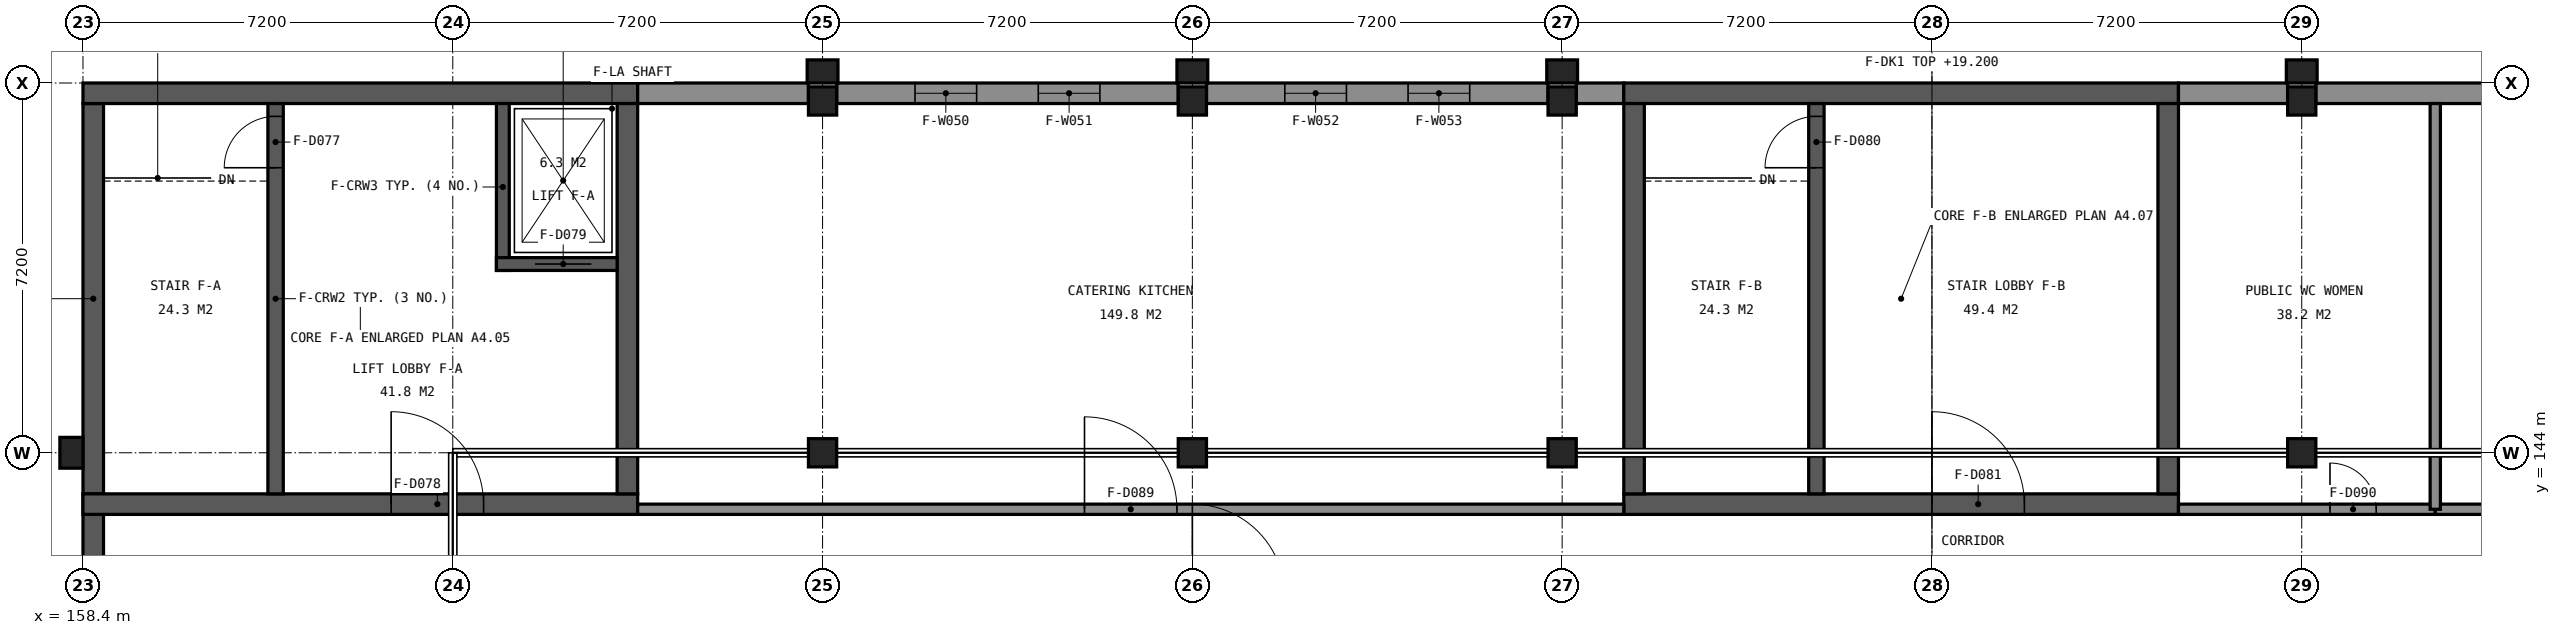
"""IFC4 building model, lengths in metres.
Left out: names, types, materials, properties, quantities, classifications, styles, units other than length and angle.
Written with IfcOpenShell. Run it as: python <this file> out.ifc"""

import sys

from ifc_helpers import new_model, si_unit, direction, frame, frame_2d, origin, origin_2d, place, context, subcontext, project, spatial, rectangle, extrude, element, fill, save


model = new_model("IFC4")
c1 = context("Model", 3, precision=1e-05, world=origin(), true_north=direction((0.0, 1.0)))
c2 = subcontext(c1, "Body", "Model", "MODEL_VIEW")
j1 = project(units=[si_unit("LENGTHUNIT", "METRE"), si_unit("PLANEANGLEUNIT", "RADIAN")], contexts=[c1])
p1 = place(None, origin())
s1 = spatial("IfcSite", under=j1, at=p1, CompositionType="ELEMENT")
p2 = place(p1, origin())
s2 = spatial("IfcBuilding", under=s1, at=p2, CompositionType="ELEMENT")
p3 = place(p2, frame((0.0, 0.0, 14.4)))
s3 = spatial("IfcBuildingStorey", under=s2, at=p3, CompositionType="ELEMENT", Elevation=14.4)
for number, where, z_axis, x_axis in (
    (1, (172.8, 144.0, 0.0), (0.0, 0.0, 1.0), (1.0, 0.0, 0.0)),
    (2, (180.0, 144.0, 0.0), (0.0, 0.0, 1.0), (1.0, 0.0, 0.0)),
    (3, (187.2, 144.0, 0.0), (0.0, 0.0, 1.0), (1.0, 0.0, 0.0)),
    (4, (201.6, 144.0, 0.0), (0.0, 0.0, 1.0), (1.0, 0.0, 0.0)),
    (5, (172.8, 150.85, 0.0), (0.0, 0.0, 1.0), (1.0, 0.0, 0.0)),
    (6, (180.0, 150.85, 0.0), (0.0, 0.0, 1.0), (1.0, 0.0, 0.0)),
    (7, (187.2, 150.85, 0.0), (0.0, 0.0, 1.0), (1.0, 0.0, 0.0)),
    (8, (201.6, 150.85, 0.0), (0.0, 0.0, 1.0), (1.0, 0.0, 0.0)),
):
    element("IfcColumn", number, at=place(p3, frame(where, z_axis=z_axis, x_axis=x_axis)), inside=s3, PredefinedType="COLUMN", context=c2, shape_type="SweptSolid", body=[
        extrude(rectangle(XDim=0.55, YDim=0.55, at=origin_2d()), origin(), (0.0, 0.0, 1.0), 4.8),
    ])
p4 = place(p3, frame((158.6, 137.075, 0.0), z_axis=(0.0, 0.0, 1.0), x_axis=(0.0, 1.0, 0.0)))
e9 = element("IfcWall", 9, at=p4, inside=s3, PredefinedType="SHEAR", context=c2, shape_type="SweptSolid", body=[
    extrude(rectangle(XDim=6.125, YDim=0.4, at=frame_2d((3.062, 0.0))), origin(), (0.0, 0.0, 1.0), 3.95),
])
p5 = place(p4, frame((1.262, 0.0, 1.8)))
e10 = element("IfcOpeningElement", 10, at=p5, cuts=e9, PredefinedType="OPENING", context=c2, shape_type="SweptSolid", body=[
    extrude(rectangle(XDim=1.2, YDim=1.2, at=frame_2d((0.6, 0.6))), frame((0.0, 0.21, 0.0), z_axis=(0.0, -1.0, 0.0), x_axis=(1.0, 0.0, 0.0)), (0.0, 0.0, 1.0), 0.42),
])
p6 = place(p3, frame((158.6, 143.2, 0.0), z_axis=(0.0, 0.0, 1.0), x_axis=(0.0, 1.0, 0.0)))
e11 = element("IfcWall", 11, at=p6, inside=s3, PredefinedType="SHEAR", context=c2, shape_type="SweptSolid", body=[
    extrude(rectangle(XDim=7.6, YDim=0.4, at=frame_2d((3.8, 0.0))), origin(), (0.0, 0.0, 1.0), 4.55),
])
p7 = place(p3, frame((158.4, 151.0, 0.0), z_axis=(0.0, 0.0, 1.0), x_axis=(1.0, 0.0, 0.0)))
e12 = element("IfcWall", 12, at=p7, inside=s3, PredefinedType="SHEAR", context=c2, shape_type="SweptSolid", body=[
    extrude(rectangle(XDim=10.8, YDim=0.4, at=frame_2d((5.4, 0.0))), origin(), (0.0, 0.0, 1.0), 4.55),
])
p8 = place(p3, frame((169.2, 151.0, 0.0), z_axis=(0.0, 0.0, 1.0), x_axis=(1.0, 0.0, 0.0)))
e13 = element("IfcWall", 13, at=p8, inside=s3, PredefinedType="SOLIDWALL", context=c2, shape_type="SweptSolid", body=[
    extrude(rectangle(XDim=3.325, YDim=0.4, at=frame_2d((1.663, 0.0))), origin(), (0.0, 0.0, 1.0), 3.95),
])
p9 = place(p3, frame((173.075, 151.0, 0.0), z_axis=(0.0, 0.0, 1.0), x_axis=(1.0, 0.0, 0.0)))
e14 = element("IfcWall", 14, at=p9, inside=s3, PredefinedType="SOLIDWALL", context=c2, shape_type="SweptSolid", body=[
    extrude(rectangle(XDim=6.65, YDim=0.4, at=frame_2d((3.325, 0.0))), origin(), (0.0, 0.0, 1.0), 3.95),
])
p10 = place(p9, frame((1.525, 0.0, 1.8)))
e15 = element("IfcOpeningElement", 15, at=p10, cuts=e14, PredefinedType="OPENING", context=c2, shape_type="SweptSolid", body=[
    extrude(rectangle(XDim=1.2, YDim=1.2, at=frame_2d((0.6, 0.6))), frame((0.0, 0.21, 0.0), z_axis=(0.0, -1.0, 0.0), x_axis=(1.0, 0.0, 0.0)), (0.0, 0.0, 1.0), 0.42),
])
p11 = place(p9, frame((3.925, 0.0, 1.8)))
e16 = element("IfcOpeningElement", 16, at=p11, cuts=e14, PredefinedType="OPENING", context=c2, shape_type="SweptSolid", body=[
    extrude(rectangle(XDim=1.2, YDim=1.2, at=frame_2d((0.6, 0.6))), frame((0.0, 0.21, 0.0), z_axis=(0.0, -1.0, 0.0), x_axis=(1.0, 0.0, 0.0)), (0.0, 0.0, 1.0), 0.42),
])
p12 = place(p3, frame((180.275, 151.0, 0.0), z_axis=(0.0, 0.0, 1.0), x_axis=(1.0, 0.0, 0.0)))
e17 = element("IfcWall", 17, at=p12, inside=s3, PredefinedType="SOLIDWALL", context=c2, shape_type="SweptSolid", body=[
    extrude(rectangle(XDim=6.65, YDim=0.4, at=frame_2d((3.325, 0.0))), origin(), (0.0, 0.0, 1.0), 3.95),
])
p13 = place(p12, frame((1.525, 0.0, 1.8)))
e18 = element("IfcOpeningElement", 18, at=p13, cuts=e17, PredefinedType="OPENING", context=c2, shape_type="SweptSolid", body=[
    extrude(rectangle(XDim=1.2, YDim=1.2, at=frame_2d((0.6, 0.6))), frame((0.0, 0.21, 0.0), z_axis=(0.0, -1.0, 0.0), x_axis=(1.0, 0.0, 0.0)), (0.0, 0.0, 1.0), 0.42),
])
p14 = place(p12, frame((3.925, 0.0, 1.8)))
e19 = element("IfcOpeningElement", 19, at=p14, cuts=e17, PredefinedType="OPENING", context=c2, shape_type="SweptSolid", body=[
    extrude(rectangle(XDim=1.2, YDim=1.2, at=frame_2d((0.6, 0.6))), frame((0.0, 0.21, 0.0), z_axis=(0.0, -1.0, 0.0), x_axis=(1.0, 0.0, 0.0)), (0.0, 0.0, 1.0), 0.42),
])
p15 = place(p3, frame((187.475, 151.0, 0.0), z_axis=(0.0, 0.0, 1.0), x_axis=(1.0, 0.0, 0.0)))
e20 = element("IfcWall", 20, at=p15, inside=s3, PredefinedType="SOLIDWALL", context=c2, shape_type="SweptSolid", body=[
    extrude(rectangle(XDim=0.925, YDim=0.4, at=frame_2d((0.462, 0.0))), origin(), (0.0, 0.0, 1.0), 3.95),
])
p16 = place(p3, frame((188.4, 151.0, 0.0), z_axis=(0.0, 0.0, 1.0), x_axis=(1.0, 0.0, 0.0)))
e21 = element("IfcWall", 21, at=p16, inside=s3, PredefinedType="SHEAR", context=c2, shape_type="SweptSolid", body=[
    extrude(rectangle(XDim=10.8, YDim=0.4, at=frame_2d((5.4, 0.0))), origin(), (0.0, 0.0, 1.0), 4.55),
])
p17 = place(p3, frame((199.2, 151.0, 0.0), z_axis=(0.0, 0.0, 1.0), x_axis=(1.0, 0.0, 0.0)))
e22 = element("IfcWall", 22, at=p17, inside=s3, PredefinedType="SOLIDWALL", context=c2, shape_type="SweptSolid", body=[
    extrude(rectangle(XDim=2.125, YDim=0.4, at=frame_2d((1.062, 0.0))), origin(), (0.0, 0.0, 1.0), 3.95),
])
p18 = place(p3, frame((201.875, 151.0, 0.0), z_axis=(0.0, 0.0, 1.0), x_axis=(1.0, 0.0, 0.0)))
e23 = element("IfcWall", 23, at=p18, inside=s3, PredefinedType="SOLIDWALL", context=c2, shape_type="SweptSolid", body=[
    extrude(rectangle(XDim=6.65, YDim=0.4, at=frame_2d((3.325, 0.0))), origin(), (0.0, 0.0, 1.0), 3.95),
])
p19 = place(p18, frame((3.925, 0.0, 1.8)))
e24 = element("IfcOpeningElement", 24, at=p19, cuts=e23, PredefinedType="OPENING", context=c2, shape_type="SweptSolid", body=[
    extrude(rectangle(XDim=1.2, YDim=1.2, at=frame_2d((0.6, 0.6))), frame((0.0, 0.21, 0.0), z_axis=(0.0, -1.0, 0.0), x_axis=(1.0, 0.0, 0.0)), (0.0, 0.0, 1.0), 0.42),
])
p20 = place(p3, frame((158.4, 143.0, 0.0), z_axis=(0.0, 0.0, 1.0), x_axis=(1.0, 0.0, 0.0)))
e25 = element("IfcWall", 25, at=p20, inside=s3, PredefinedType="SHEAR", context=c2, shape_type="SweptSolid", body=[
    extrude(rectangle(XDim=10.8, YDim=0.4, at=frame_2d((5.4, 0.0))), origin(), (0.0, 0.0, 1.0), 4.55),
])
p21 = place(p20, frame((6.0, 0.0, 0.0)))
e26 = element("IfcOpeningElement", 26, at=p21, cuts=e25, PredefinedType="OPENING", context=c2, shape_type="SweptSolid", body=[
    extrude(rectangle(XDim=1.8, YDim=2.1, at=frame_2d((0.9, 1.05))), frame((0.0, 0.21, 0.0), z_axis=(0.0, -1.0, 0.0), x_axis=(1.0, 0.0, 0.0)), (0.0, 0.0, 1.0), 0.42),
])
p22 = place(p3, frame((169.0, 143.2, 0.0), z_axis=(0.0, 0.0, 1.0), x_axis=(0.0, 1.0, 0.0)))
e27 = element("IfcWall", 27, at=p22, inside=s3, PredefinedType="SHEAR", context=c2, shape_type="SweptSolid", body=[
    extrude(rectangle(XDim=7.6, YDim=0.4, at=frame_2d((3.8, 0.0))), origin(), (0.0, 0.0, 1.0), 4.55),
])
p23 = place(p3, frame((162.15, 143.2, 0.0), z_axis=(0.0, 0.0, 1.0), x_axis=(0.0, 1.0, 0.0)))
e28 = element("IfcWall", 28, at=p23, inside=s3, PredefinedType="SHEAR", context=c2, shape_type="SweptSolid", body=[
    extrude(rectangle(XDim=7.6, YDim=0.3, at=frame_2d((3.8, 0.0))), origin(), (0.0, 0.0, 1.0), 4.55),
])
p24 = place(p23, frame((6.35, 0.0, 0.0)))
e29 = element("IfcOpeningElement", 29, at=p24, cuts=e28, PredefinedType="OPENING", context=c2, shape_type="SweptSolid", body=[
    extrude(rectangle(XDim=1.0, YDim=2.1, at=frame_2d((0.5, 1.05))), frame((0.0, 0.16, 0.0), z_axis=(0.0, -1.0, 0.0), x_axis=(1.0, 0.0, 0.0)), (0.0, 0.0, 1.0), 0.32),
])
p25 = place(p3, frame((166.575, 147.55, 0.0), z_axis=(0.0, 0.0, 1.0), x_axis=(0.0, 1.0, 0.0)))
e30 = element("IfcWall", 30, at=p25, inside=s3, PredefinedType="SHEAR", context=c2, shape_type="SweptSolid", body=[
    extrude(rectangle(XDim=3.25, YDim=0.25, at=frame_2d((1.625, 0.0))), origin(), (0.0, 0.0, 1.0), 4.55),
])
p26 = place(p3, frame((166.45, 147.675, 0.0), z_axis=(0.0, 0.0, 1.0), x_axis=(1.0, 0.0, 0.0)))
e31 = element("IfcWall", 31, at=p26, inside=s3, PredefinedType="SHEAR", context=c2, shape_type="SweptSolid", body=[
    extrude(rectangle(XDim=2.35, YDim=0.25, at=frame_2d((1.175, 0.0))), origin(), (0.0, 0.0, 1.0), 4.55),
])
p27 = place(p26, frame((0.75, 0.0, 0.0)))
e32 = element("IfcOpeningElement", 32, at=p27, cuts=e31, PredefinedType="OPENING", context=c2, shape_type="SweptSolid", body=[
    extrude(rectangle(XDim=1.1, YDim=2.1, at=frame_2d((0.55, 1.05))), frame((0.0, 0.135, 0.0), z_axis=(0.0, -1.0, 0.0), x_axis=(1.0, 0.0, 0.0)), (0.0, 0.0, 1.0), 0.27),
])
p28 = place(p3, frame((188.4, 143.0, 0.0), z_axis=(0.0, 0.0, 1.0), x_axis=(1.0, 0.0, 0.0)))
e33 = element("IfcWall", 33, at=p28, inside=s3, PredefinedType="SHEAR", context=c2, shape_type="SweptSolid", body=[
    extrude(rectangle(XDim=10.8, YDim=0.4, at=frame_2d((5.4, 0.0))), origin(), (0.0, 0.0, 1.0), 4.55),
])
p29 = place(p28, frame((6.0, 0.0, 0.0)))
e34 = element("IfcOpeningElement", 34, at=p29, cuts=e33, PredefinedType="OPENING", context=c2, shape_type="SweptSolid", body=[
    extrude(rectangle(XDim=1.8, YDim=2.1, at=frame_2d((0.9, 1.05))), frame((0.0, 0.21, 0.0), z_axis=(0.0, -1.0, 0.0), x_axis=(1.0, 0.0, 0.0)), (0.0, 0.0, 1.0), 0.42),
])
for number, where, z_axis, x_axis in (
    (35, (188.6, 143.2, 0.0), (0.0, 0.0, 1.0), (0.0, 1.0, 0.0)),
    (36, (199.0, 143.2, 0.0), (0.0, 0.0, 1.0), (0.0, 1.0, 0.0)),
):
    element("IfcWall", number, at=place(p3, frame(where, z_axis=z_axis, x_axis=x_axis)), inside=s3, PredefinedType="SHEAR", context=c2, shape_type="SweptSolid", body=[
        extrude(rectangle(XDim=7.6, YDim=0.4, at=frame_2d((3.8, 0.0))), origin(), (0.0, 0.0, 1.0), 4.55),
    ])
p30 = place(p3, frame((192.15, 143.2, 0.0), z_axis=(0.0, 0.0, 1.0), x_axis=(0.0, 1.0, 0.0)))
e37 = element("IfcWall", 37, at=p30, inside=s3, PredefinedType="SHEAR", context=c2, shape_type="SweptSolid", body=[
    extrude(rectangle(XDim=7.6, YDim=0.3, at=frame_2d((3.8, 0.0))), origin(), (0.0, 0.0, 1.0), 4.55),
])
p31 = place(p30, frame((6.35, 0.0, 0.0)))
e38 = element("IfcOpeningElement", 38, at=p31, cuts=e37, PredefinedType="OPENING", context=c2, shape_type="SweptSolid", body=[
    extrude(rectangle(XDim=1.0, YDim=2.1, at=frame_2d((0.5, 1.05))), frame((0.0, 0.16, 0.0), z_axis=(0.0, -1.0, 0.0), x_axis=(1.0, 0.0, 0.0)), (0.0, 0.0, 1.0), 0.32),
])
p32 = place(p3, frame((158.4, 151.0, 4.8), z_axis=(0.0, 0.0, 1.0), x_axis=(1.0, 0.0, 0.0)))
e39 = element("IfcWall", 39, at=p32, inside=s3, PredefinedType="SOLIDWALL", context=c2, shape_type="SweptSolid", body=[
    extrude(rectangle(XDim=72.0, YDim=0.4, at=frame_2d((36.0, 0.0))), origin(), (0.0, 0.0, 1.0), 0.45),
])
p33 = place(p3, frame((158.6, 130.0, 4.8), z_axis=(0.0, 0.0, 1.0), x_axis=(0.0, 1.0, 0.0)))
e40 = element("IfcWall", 40, at=p33, inside=s3, PredefinedType="SOLIDWALL", context=c2, shape_type="SweptSolid", body=[
    extrude(rectangle(XDim=20.8, YDim=0.4, at=frame_2d((10.4, 0.0))), origin(), (0.0, 0.0, 1.0), 0.45),
])
for number, where, z_axis, x_axis in (
    (41, (165.6, 144.0, 4.8), (0.0, 0.0, 1.0), (1.0, 0.0, 0.0)),
    (42, (172.8, 144.0, 4.8), (0.0, 0.0, 1.0), (1.0, 0.0, 0.0)),
    (43, (180.0, 144.0, 4.8), (0.0, 0.0, 1.0), (1.0, 0.0, 0.0)),
    (44, (187.2, 144.0, 4.8), (0.0, 0.0, 1.0), (1.0, 0.0, 0.0)),
    (45, (194.4, 144.0, 4.8), (0.0, 0.0, 1.0), (1.0, 0.0, 0.0)),
    (46, (201.6, 144.0, 4.8), (0.0, 0.0, 1.0), (1.0, 0.0, 0.0)),
):
    element("IfcColumn", number, at=place(p3, frame(where, z_axis=z_axis, x_axis=x_axis)), inside=s3, PredefinedType="COLUMN", context=c2, shape_type="SweptSolid", body=[
        extrude(rectangle(XDim=0.3, YDim=0.3, at=origin_2d()), origin(), (0.0, 0.0, 1.0), 1.4),
    ])
for number, where, z_axis, x_axis in (
    (47, (172.8, 151.425, 0.0), (0.0, 0.0, 1.0), (1.0, 0.0, 0.0)),
    (48, (180.0, 151.425, 0.0), (0.0, 0.0, 1.0), (1.0, 0.0, 0.0)),
    (49, (187.2, 151.425, 0.0), (0.0, 0.0, 1.0), (1.0, 0.0, 0.0)),
    (50, (201.6, 151.425, 0.0), (0.0, 0.0, 1.0), (1.0, 0.0, 0.0)),
    (51, (158.175, 144.0, 0.0), (0.0, 0.0, 1.0), (0.0, 1.0, 0.0)),
):
    element("IfcColumn", number, at=place(p3, frame(where, z_axis=z_axis, x_axis=x_axis)), inside=s3, PredefinedType="PILASTER", context=c2, shape_type="SweptSolid", body=[
        extrude(rectangle(XDim=0.6, YDim=0.45, at=origin_2d()), origin(), (0.0, 0.0, 1.0), 4.05),
    ])
p34 = place(p3, frame((157.8, 151.7, 4.5), z_axis=(0.0, 0.0, 1.0), x_axis=(1.0, 0.0, 0.0)))
e52 = element("IfcWall", 52, at=p34, inside=s3, PredefinedType="SOLIDWALL", context=c2, shape_type="SweptSolid", body=[
    extrude(rectangle(XDim=72.6, YDim=0.2, at=frame_2d((36.3, 0.0))), origin(), (0.0, 0.0, 1.0), 0.45),
])
p35 = place(p3, frame((157.9, 129.6, 4.5), z_axis=(0.0, 0.0, 1.0), x_axis=(0.0, 1.0, 0.0)))
e53 = element("IfcWall", 53, at=p35, inside=s3, PredefinedType="SOLIDWALL", context=c2, shape_type="SweptSolid", body=[
    extrude(rectangle(XDim=21.6, YDim=0.2, at=frame_2d((10.8, 0.0))), origin(), (0.0, 0.0, 1.0), 0.45),
])
p36 = place(p3, frame((169.2, 142.9, 0.0), z_axis=(0.0, 0.0, 1.0), x_axis=(1.0, 0.0, 0.0)))
e54 = element("IfcWall", 54, at=p36, inside=s3, PredefinedType="PARTITIONING", context=c2, shape_type="SweptSolid", body=[
    extrude(rectangle(XDim=19.2, YDim=0.2, at=frame_2d((9.6, 0.0))), origin(), (0.0, 0.0, 1.0), 3.95),
])
p37 = place(p36, frame((8.7, 0.0, 0.0)))
e55 = element("IfcOpeningElement", 55, at=p37, cuts=e54, PredefinedType="OPENING", context=c2, shape_type="SweptSolid", body=[
    extrude(rectangle(XDim=1.8, YDim=2.1, at=frame_2d((0.9, 1.05))), frame((0.0, 0.11, 0.0), z_axis=(0.0, -1.0, 0.0), x_axis=(1.0, 0.0, 0.0)), (0.0, 0.0, 1.0), 0.22),
])
p38 = place(p3, frame((199.2, 142.9, 0.0), z_axis=(0.0, 0.0, 1.0), x_axis=(1.0, 0.0, 0.0)))
e56 = element("IfcWall", 56, at=p38, inside=s3, PredefinedType="PARTITIONING", context=c2, shape_type="SweptSolid", body=[
    extrude(rectangle(XDim=5.0, YDim=0.2, at=frame_2d((2.5, 0.0))), origin(), (0.0, 0.0, 1.0), 3.95),
])
p39 = place(p38, frame((2.95, 0.0, 0.0)))
e57 = element("IfcOpeningElement", 57, at=p39, cuts=e56, PredefinedType="OPENING", context=c2, shape_type="SweptSolid", body=[
    extrude(rectangle(XDim=0.9, YDim=2.1, at=frame_2d((0.45, 1.05))), frame((0.0, 0.11, 0.0), z_axis=(0.0, -1.0, 0.0), x_axis=(1.0, 0.0, 0.0)), (0.0, 0.0, 1.0), 0.22),
])
p40 = place(p3, frame((204.2, 142.9, 0.0), z_axis=(0.0, 0.0, 1.0), x_axis=(1.0, 0.0, 0.0)))
e58 = element("IfcWall", 58, at=p40, inside=s3, PredefinedType="PARTITIONING", context=c2, shape_type="SweptSolid", body=[
    extrude(rectangle(XDim=5.0, YDim=0.2, at=frame_2d((2.5, 0.0))), origin(), (0.0, 0.0, 1.0), 3.95),
])
p41 = place(p40, frame((2.05, 0.0, 0.0)))
e59 = element("IfcOpeningElement", 59, at=p41, cuts=e58, PredefinedType="OPENING", context=c2, shape_type="SweptSolid", body=[
    extrude(rectangle(XDim=0.9, YDim=2.1, at=frame_2d((0.45, 1.05))), frame((0.0, 0.11, 0.0), z_axis=(0.0, -1.0, 0.0), x_axis=(1.0, 0.0, 0.0)), (0.0, 0.0, 1.0), 0.22),
])
p42 = place(p3, frame((204.2, 142.9, 0.0), z_axis=(0.0, 0.0, 1.0), x_axis=(0.0, 1.0, 0.0)))
e60 = element("IfcWall", 60, at=p42, inside=s3, PredefinedType="PARTITIONING", context=c2, shape_type="SweptSolid", body=[
    extrude(rectangle(XDim=7.9, YDim=0.2, at=frame_2d((3.95, 0.0))), origin(), (0.0, 0.0, 1.0), 3.95),
])
p43 = place(p10, origin())
e61 = element("IfcWindow", 61, at=p43, inside=s3, PartitioningType="SINGLE_PANEL", PredefinedType="WINDOW", context=c2, shape_type="SweptSolid", body=[
    extrude(rectangle(XDim=1.2, YDim=1.2, at=frame_2d((0.6, 0.6))), frame((0.0, -0.09, 0.0), z_axis=(0.0, -1.0, 0.0), x_axis=(1.0, 0.0, 0.0)), (0.0, 0.0, 1.0), 0.06),
])
fill(e15, e61)
p44 = place(p11, origin())
e62 = element("IfcWindow", 62, at=p44, inside=s3, PartitioningType="SINGLE_PANEL", PredefinedType="WINDOW", context=c2, shape_type="SweptSolid", body=[
    extrude(rectangle(XDim=1.2, YDim=1.2, at=frame_2d((0.6, 0.6))), frame((0.0, -0.09, 0.0), z_axis=(0.0, -1.0, 0.0), x_axis=(1.0, 0.0, 0.0)), (0.0, 0.0, 1.0), 0.06),
])
fill(e16, e62)
p45 = place(p13, origin())
e63 = element("IfcWindow", 63, at=p45, inside=s3, PartitioningType="SINGLE_PANEL", PredefinedType="WINDOW", context=c2, shape_type="SweptSolid", body=[
    extrude(rectangle(XDim=1.2, YDim=1.2, at=frame_2d((0.6, 0.6))), frame((0.0, -0.09, 0.0), z_axis=(0.0, -1.0, 0.0), x_axis=(1.0, 0.0, 0.0)), (0.0, 0.0, 1.0), 0.06),
])
fill(e18, e63)
p46 = place(p14, origin())
e64 = element("IfcWindow", 64, at=p46, inside=s3, PartitioningType="SINGLE_PANEL", PredefinedType="WINDOW", context=c2, shape_type="SweptSolid", body=[
    extrude(rectangle(XDim=1.2, YDim=1.2, at=frame_2d((0.6, 0.6))), frame((0.0, -0.09, 0.0), z_axis=(0.0, -1.0, 0.0), x_axis=(1.0, 0.0, 0.0)), (0.0, 0.0, 1.0), 0.06),
])
fill(e19, e64)
p47 = place(p24, origin())
e65 = element("IfcDoor", 65, at=p47, inside=s3, OperationType="NOTDEFINED", PredefinedType="DOOR", context=c2, shape_type="SweptSolid", body=[
    extrude(rectangle(XDim=1.0, YDim=2.1, at=frame_2d((0.5, 1.05))), frame((0.0, 0.025, 0.0), z_axis=(0.0, -1.0, 0.0), x_axis=(1.0, 0.0, 0.0)), (0.0, 0.0, 1.0), 0.05),
])
fill(e29, e65)
p48 = place(p21, origin())
e66 = element("IfcDoor", 66, at=p48, inside=s3, OperationType="NOTDEFINED", PredefinedType="DOOR", context=c2, shape_type="SweptSolid", body=[
    extrude(rectangle(XDim=1.8, YDim=2.1, at=frame_2d((0.9, 1.05))), frame((0.0, 0.025, 0.0), z_axis=(0.0, -1.0, 0.0), x_axis=(1.0, 0.0, 0.0)), (0.0, 0.0, 1.0), 0.05),
])
fill(e26, e66)
p49 = place(p27, origin())
e67 = element("IfcDoor", 67, at=p49, inside=s3, OperationType="SLIDING_TO_LEFT", PredefinedType="DOOR", context=c2, shape_type="SweptSolid", body=[
    extrude(rectangle(XDim=1.1, YDim=2.1, at=frame_2d((0.55, 1.05))), frame((0.0, 0.025, 0.0), z_axis=(0.0, -1.0, 0.0), x_axis=(1.0, 0.0, 0.0)), (0.0, 0.0, 1.0), 0.05),
])
fill(e32, e67)
p50 = place(p31, origin())
e68 = element("IfcDoor", 68, at=p50, inside=s3, OperationType="NOTDEFINED", PredefinedType="DOOR", context=c2, shape_type="SweptSolid", body=[
    extrude(rectangle(XDim=1.0, YDim=2.1, at=frame_2d((0.5, 1.05))), frame((0.0, 0.025, 0.0), z_axis=(0.0, -1.0, 0.0), x_axis=(1.0, 0.0, 0.0)), (0.0, 0.0, 1.0), 0.05),
])
fill(e38, e68)
p51 = place(p29, origin())
e69 = element("IfcDoor", 69, at=p51, inside=s3, OperationType="NOTDEFINED", PredefinedType="DOOR", context=c2, shape_type="SweptSolid", body=[
    extrude(rectangle(XDim=1.8, YDim=2.1, at=frame_2d((0.9, 1.05))), frame((0.0, 0.025, 0.0), z_axis=(0.0, -1.0, 0.0), x_axis=(1.0, 0.0, 0.0)), (0.0, 0.0, 1.0), 0.05),
])
fill(e34, e69)
p52 = place(p37, origin())
e70 = element("IfcDoor", 70, at=p52, inside=s3, OperationType="NOTDEFINED", PredefinedType="DOOR", context=c2, shape_type="SweptSolid", body=[
    extrude(rectangle(XDim=1.8, YDim=2.1, at=frame_2d((0.9, 1.05))), frame((0.0, 0.025, 0.0), z_axis=(0.0, -1.0, 0.0), x_axis=(1.0, 0.0, 0.0)), (0.0, 0.0, 1.0), 0.05),
])
fill(e55, e70)
p53 = place(p39, origin())
e71 = element("IfcDoor", 71, at=p53, inside=s3, OperationType="NOTDEFINED", PredefinedType="DOOR", context=c2, shape_type="SweptSolid", body=[
    extrude(rectangle(XDim=0.9, YDim=2.1, at=frame_2d((0.45, 1.05))), frame((0.0, 0.025, 0.0), z_axis=(0.0, -1.0, 0.0), x_axis=(1.0, 0.0, 0.0)), (0.0, 0.0, 1.0), 0.05),
])
fill(e57, e71)
save(model, sys.argv[1])
